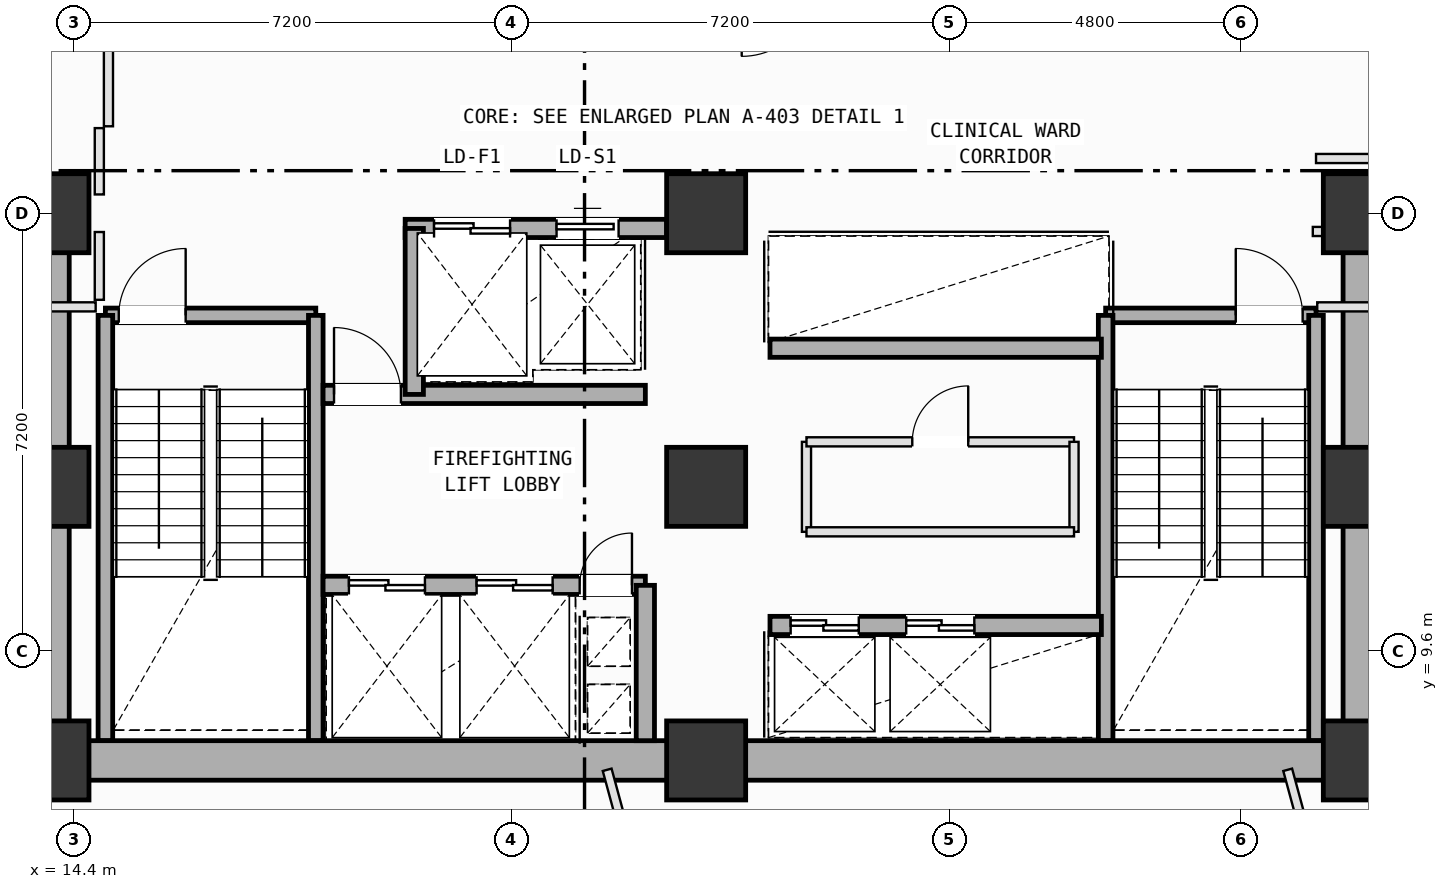
"""IFC4 building model, lengths in metres.
Left out: names, types, materials, properties, quantities, classifications, styles, units other than length and angle.
Written with IfcOpenShell. Run it as: python <this file> out.ifc"""

import sys

from ifc_helpers import new_model, si_unit, direction, frame, frame_2d, origin, origin_2d, place, context, subcontext, project, spatial, rectangle, extrude, element, fill, save


model = new_model("IFC4")
c1 = context("Model", 3, precision=1e-05, world=origin(), true_north=direction((0.0, 1.0)))
c2 = subcontext(c1, "Body", "Model", "MODEL_VIEW")
j1 = project(units=[si_unit("LENGTHUNIT", "METRE"), si_unit("PLANEANGLEUNIT", "RADIAN")], contexts=[c1])
p1 = place(None, origin())
s1 = spatial("IfcSite", under=j1, at=p1, CompositionType="ELEMENT")
p2 = place(p1, origin())
s2 = spatial("IfcBuilding", under=s1, at=p2, CompositionType="ELEMENT")
p3 = place(p2, frame((0.0, 0.0, 88.4)))
s3 = spatial("IfcBuildingStorey", under=s2, at=p3, CompositionType="ELEMENT", Elevation=88.4)
for number, where, z_axis, x_axis in (
    (1, (14.0, 7.8, 0.0), (0.0, 0.0, 1.0), (1.0, 0.0, 0.0)),
    (2, (14.0, 12.3, 0.0), (0.0, 0.0, 1.0), (1.0, 0.0, 0.0)),
    (3, (14.0, 16.8, 0.0), (0.0, 0.0, 1.0), (1.0, 0.0, 0.0)),
    (4, (24.8, 7.8, 0.0), (0.0, 0.0, 1.0), (1.0, 0.0, 0.0)),
    (5, (24.8, 12.3, 0.0), (0.0, 0.0, 1.0), (1.0, 0.0, 0.0)),
    (6, (24.8, 16.8, 0.0), (0.0, 0.0, 1.0), (1.0, 0.0, 0.0)),
    (7, (35.6, 7.8, 0.0), (0.0, 0.0, 1.0), (1.0, 0.0, 0.0)),
    (8, (35.6, 12.3, 0.0), (0.0, 0.0, 1.0), (1.0, 0.0, 0.0)),
    (9, (35.6, 16.8, 0.0), (0.0, 0.0, 1.0), (1.0, 0.0, 0.0)),
):
    element("IfcColumn", number, at=place(p3, frame(where, z_axis=z_axis, x_axis=x_axis)), inside=s3, PredefinedType="COLUMN", context=c2, shape_type="SweptSolid", body=[
        extrude(rectangle(XDim=1.3, YDim=1.3, at=origin_2d()), origin(), (0.0, 0.0, 1.0), 4.0),
    ])
p4 = place(p3, frame((14.92, 15.12, 0.0), z_axis=(0.0, 0.0, 1.0), x_axis=(1.0, 0.0, 0.0)))
e10 = element("IfcWall", 10, at=p4, inside=s3, PredefinedType="SOLIDWALL", context=c2, shape_type="SweptSolid", body=[
    extrude(rectangle(XDim=3.46, YDim=0.24, at=frame_2d((1.73, 0.0))), origin(), (0.0, 0.0, 1.0), 3.78),
])
p5 = place(p4, frame((0.22, 0.0, 0.0)))
e11 = element("IfcOpeningElement", 11, at=p5, cuts=e10, PredefinedType="OPENING", context=c2, shape_type="SweptSolid", body=[
    extrude(rectangle(XDim=1.1, YDim=2.15, at=frame_2d((0.55, 1.075))), frame((0.0, 0.13, 0.0), z_axis=(0.0, -1.0, 0.0), x_axis=(1.0, 0.0, 0.0)), (0.0, 0.0, 1.0), 0.26),
])
for number, where, z_axis, x_axis in (
    (12, (18.38, 15.12, 0.0), (0.0, 0.0, 1.0), (0.0, -1.0, 0.0)),
    (13, (14.92, 8.125, 0.0), (0.0, 0.0, 1.0), (0.0, 1.0, 0.0)),
):
    element("IfcWall", number, at=place(p3, frame(where, z_axis=z_axis, x_axis=x_axis)), inside=s3, PredefinedType="SOLIDWALL", context=c2, shape_type="SweptSolid", body=[
        extrude(rectangle(XDim=6.995, YDim=0.24, at=frame_2d((3.498, 0.0))), origin(), (0.0, 0.0, 1.0), 3.78),
    ])
p6 = place(p3, frame((31.37, 15.12, 0.0), z_axis=(0.0, 0.0, 1.0), x_axis=(1.0, 0.0, 0.0)))
e14 = element("IfcWall", 14, at=p6, inside=s3, PredefinedType="SOLIDWALL", context=c2, shape_type="SweptSolid", body=[
    extrude(rectangle(XDim=3.46, YDim=0.24, at=frame_2d((1.73, 0.0))), origin(), (0.0, 0.0, 1.0), 3.78),
])
p7 = place(p6, frame((2.14, 0.0, 0.0)))
e15 = element("IfcOpeningElement", 15, at=p7, cuts=e14, PredefinedType="OPENING", context=c2, shape_type="SweptSolid", body=[
    extrude(rectangle(XDim=1.1, YDim=2.15, at=frame_2d((0.55, 1.075))), frame((0.0, 0.13, 0.0), z_axis=(0.0, -1.0, 0.0), x_axis=(1.0, 0.0, 0.0)), (0.0, 0.0, 1.0), 0.26),
])
for number, where, z_axis, x_axis in (
    (16, (34.83, 15.12, 0.0), (0.0, 0.0, 1.0), (0.0, -1.0, 0.0)),
    (17, (31.37, 8.125, 0.0), (0.0, 0.0, 1.0), (0.0, 1.0, 0.0)),
):
    element("IfcWall", number, at=place(p3, frame(where, z_axis=z_axis, x_axis=x_axis)), inside=s3, PredefinedType="SOLIDWALL", context=c2, shape_type="SweptSolid", body=[
        extrude(rectangle(XDim=6.995, YDim=0.24, at=frame_2d((3.498, 0.0))), origin(), (0.0, 0.0, 1.0), 3.78),
    ])
for number, where, z_axis, x_axis in (
    (18, (14.0, 7.8, 0.0), (0.0, 0.0, 1.0), (1.0, 0.0, 0.0)),
    (19, (24.8, 7.8, 0.0), (0.0, 0.0, 1.0), (1.0, 0.0, 0.0)),
):
    element("IfcWall", number, at=place(p3, frame(where, z_axis=z_axis, x_axis=x_axis)), inside=s3, PredefinedType="SHEAR", context=c2, shape_type="SweptSolid", body=[
        extrude(rectangle(XDim=10.8, YDim=0.65, at=frame_2d((5.4, 0.0))), origin(), (0.0, 0.0, 1.0), 3.78),
    ])
for number, where, z_axis, x_axis in (
    (20, (35.6, 7.8, 0.0), (0.0, 0.0, 1.0), (0.0, 1.0, 0.0)),
    (21, (14.0, 16.8, 0.0), (0.0, 0.0, 1.0), (0.0, -1.0, 0.0)),
):
    element("IfcWall", number, at=place(p3, frame(where, z_axis=z_axis, x_axis=x_axis)), inside=s3, PredefinedType="SHEAR", context=c2, shape_type="SweptSolid", body=[
        extrude(rectangle(XDim=9.0, YDim=0.65, at=frame_2d((4.5, 0.0))), origin(), (0.0, 0.0, 1.0), 3.78),
    ])
p8 = place(p3, frame((19.85, 16.55, 0.0), z_axis=(0.0, 0.0, 1.0), x_axis=(1.0, 0.0, 0.0)))
e22 = element("IfcWall", 22, at=p8, inside=s3, PredefinedType="SOLIDWALL", context=c2, shape_type="SweptSolid", body=[
    extrude(rectangle(XDim=4.3, YDim=0.3, at=frame_2d((2.15, 0.0))), origin(), (0.0, 0.0, 1.0), 3.78),
])
p9 = place(p8, frame((0.475, 0.0, 0.0)))
e23 = element("IfcOpeningElement", 23, at=p9, cuts=e22, PredefinedType="OPENING", context=c2, shape_type="SweptSolid", body=[
    extrude(rectangle(XDim=1.25, YDim=2.18, at=frame_2d((0.625, 1.09))), frame((0.0, 0.16, 0.0), z_axis=(0.0, -1.0, 0.0), x_axis=(1.0, 0.0, 0.0)), (0.0, 0.0, 1.0), 0.32),
])
p10 = place(p8, frame((2.49, 0.0, 0.0)))
e24 = element("IfcOpeningElement", 24, at=p10, cuts=e22, PredefinedType="OPENING", context=c2, shape_type="SweptSolid", body=[
    extrude(rectangle(XDim=1.02, YDim=2.12, at=frame_2d((0.51, 1.06))), frame((0.0, 0.16, 0.0), z_axis=(0.0, -1.0, 0.0), x_axis=(1.0, 0.0, 0.0)), (0.0, 0.0, 1.0), 0.32),
])
p11 = place(p3, frame((18.5, 10.68, 0.0), z_axis=(0.0, 0.0, 1.0), x_axis=(1.0, 0.0, 0.0)))
e25 = element("IfcWall", 25, at=p11, inside=s3, PredefinedType="SOLIDWALL", context=c2, shape_type="SweptSolid", body=[
    extrude(rectangle(XDim=5.3, YDim=0.3, at=frame_2d((2.65, 0.0))), origin(), (0.0, 0.0, 1.0), 3.78),
])
p12 = place(p11, frame((4.22, 0.0, 0.0)))
e26 = element("IfcOpeningElement", 26, at=p12, cuts=e25, PredefinedType="OPENING", context=c2, shape_type="SweptSolid", body=[
    extrude(rectangle(XDim=0.86, YDim=2.06, at=frame_2d((0.43, 1.03))), frame((0.0, 0.16, 0.0), z_axis=(0.0, -1.0, 0.0), x_axis=(1.0, 0.0, 0.0)), (0.0, 0.0, 1.0), 0.32),
])
p13 = place(p11, frame((0.425, 0.0, 0.0)))
e27 = element("IfcOpeningElement", 27, at=p13, cuts=e25, PredefinedType="OPENING", context=c2, shape_type="SweptSolid", body=[
    extrude(rectangle(XDim=1.25, YDim=2.18, at=frame_2d((0.625, 1.09))), frame((0.0, 0.16, 0.0), z_axis=(0.0, -1.0, 0.0), x_axis=(1.0, 0.0, 0.0)), (0.0, 0.0, 1.0), 0.32),
])
p14 = place(p11, frame((2.525, 0.0, 0.0)))
e28 = element("IfcOpeningElement", 28, at=p14, cuts=e25, PredefinedType="OPENING", context=c2, shape_type="SweptSolid", body=[
    extrude(rectangle(XDim=1.25, YDim=2.18, at=frame_2d((0.625, 1.09))), frame((0.0, 0.16, 0.0), z_axis=(0.0, -1.0, 0.0), x_axis=(1.0, 0.0, 0.0)), (0.0, 0.0, 1.0), 0.32),
])
p15 = place(p3, frame((18.5, 13.82, 0.0), z_axis=(0.0, 0.0, 1.0), x_axis=(1.0, 0.0, 0.0)))
e29 = element("IfcWall", 29, at=p15, inside=s3, PredefinedType="SOLIDWALL", context=c2, shape_type="SweptSolid", body=[
    extrude(rectangle(XDim=5.3, YDim=0.3, at=frame_2d((2.65, 0.0))), origin(), (0.0, 0.0, 1.0), 3.78),
])
p16 = place(p15, frame((0.18, 0.0, 0.0)))
e30 = element("IfcOpeningElement", 30, at=p16, cuts=e29, PredefinedType="OPENING", context=c2, shape_type="SweptSolid", body=[
    extrude(rectangle(XDim=1.1, YDim=2.15, at=frame_2d((0.55, 1.075))), frame((0.0, 0.16, 0.0), z_axis=(0.0, -1.0, 0.0), x_axis=(1.0, 0.0, 0.0)), (0.0, 0.0, 1.0), 0.32),
])
p17 = place(p3, frame((23.8, 8.125, 0.0), z_axis=(0.0, 0.0, 1.0), x_axis=(0.0, 1.0, 0.0)))
e31 = element("IfcWall", 31, at=p17, inside=s3, PredefinedType="SOLIDWALL", context=c2, shape_type="SweptSolid", body=[
    extrude(rectangle(XDim=2.555, YDim=0.3, at=frame_2d((1.277, 0.0))), origin(), (0.0, 0.0, 1.0), 3.78),
])
p18 = place(p3, frame((20.0, 13.82, 0.0), z_axis=(0.0, 0.0, 1.0), x_axis=(0.0, 1.0, 0.0)))
e32 = element("IfcWall", 32, at=p18, inside=s3, PredefinedType="SOLIDWALL", context=c2, shape_type="SweptSolid", body=[
    extrude(rectangle(XDim=2.73, YDim=0.3, at=frame_2d((1.365, 0.0))), origin(), (0.0, 0.0, 1.0), 3.78),
])
p19 = place(p3, frame((25.85, 10.02, 0.0), z_axis=(0.0, 0.0, 1.0), x_axis=(1.0, 0.0, 0.0)))
e33 = element("IfcWall", 33, at=p19, inside=s3, PredefinedType="SOLIDWALL", context=c2, shape_type="SweptSolid", body=[
    extrude(rectangle(XDim=5.45, YDim=0.3, at=frame_2d((2.725, 0.0))), origin(), (0.0, 0.0, 1.0), 3.78),
])
p20 = place(p19, frame((0.34, 0.0, 0.0)))
e34 = element("IfcOpeningElement", 34, at=p20, cuts=e33, PredefinedType="OPENING", context=c2, shape_type="SweptSolid", body=[
    extrude(rectangle(XDim=1.12, YDim=2.15, at=frame_2d((0.56, 1.075))), frame((0.0, 0.16, 0.0), z_axis=(0.0, -1.0, 0.0), x_axis=(1.0, 0.0, 0.0)), (0.0, 0.0, 1.0), 0.32),
])
p21 = place(p19, frame((2.24, 0.0, 0.0)))
e35 = element("IfcOpeningElement", 35, at=p21, cuts=e33, PredefinedType="OPENING", context=c2, shape_type="SweptSolid", body=[
    extrude(rectangle(XDim=1.12, YDim=2.15, at=frame_2d((0.56, 1.075))), frame((0.0, 0.16, 0.0), z_axis=(0.0, -1.0, 0.0), x_axis=(1.0, 0.0, 0.0)), (0.0, 0.0, 1.0), 0.32),
])
p22 = place(p3, frame((25.85, 14.58, 0.0), z_axis=(0.0, 0.0, 1.0), x_axis=(1.0, 0.0, 0.0)))
e36 = element("IfcWall", 36, at=p22, inside=s3, PredefinedType="SOLIDWALL", context=c2, shape_type="SweptSolid", body=[
    extrude(rectangle(XDim=5.45, YDim=0.3, at=frame_2d((2.725, 0.0))), origin(), (0.0, 0.0, 1.0), 3.78),
])
p23 = place(p3, frame((26.45, 11.56, 0.0), z_axis=(0.0, 0.0, 1.0), x_axis=(0.0, 1.0, 0.0)))
e37 = element("IfcWall", 37, at=p23, inside=s3, PredefinedType="PARTITIONING", context=c2, shape_type="SweptSolid", body=[
    extrude(rectangle(XDim=1.48, YDim=0.15, at=frame_2d((0.74, 0.0))), origin(), (0.0, 0.0, 1.0), 3.78),
])
p24 = place(p3, frame((26.45, 13.04, 0.0), z_axis=(0.0, 0.0, 1.0), x_axis=(1.0, 0.0, 0.0)))
e38 = element("IfcWall", 38, at=p24, inside=s3, PredefinedType="PARTITIONING", context=c2, shape_type="SweptSolid", body=[
    extrude(rectangle(XDim=4.4, YDim=0.15, at=frame_2d((2.2, 0.0))), origin(), (0.0, 0.0, 1.0), 3.78),
])
p25 = place(p24, frame((1.74, 0.0, 0.0)))
e39 = element("IfcOpeningElement", 39, at=p25, cuts=e38, PredefinedType="OPENING", context=c2, shape_type="SweptSolid", body=[
    extrude(rectangle(XDim=0.92, YDim=2.1, at=frame_2d((0.46, 1.05))), frame((0.0, 0.085, 0.0), z_axis=(0.0, -1.0, 0.0), x_axis=(1.0, 0.0, 0.0)), (0.0, 0.0, 1.0), 0.17),
])
p26 = place(p3, frame((30.85, 13.04, 0.0), z_axis=(0.0, 0.0, 1.0), x_axis=(0.0, -1.0, 0.0)))
e40 = element("IfcWall", 40, at=p26, inside=s3, PredefinedType="PARTITIONING", context=c2, shape_type="SweptSolid", body=[
    extrude(rectangle(XDim=1.48, YDim=0.15, at=frame_2d((0.74, 0.0))), origin(), (0.0, 0.0, 1.0), 3.78),
])
p27 = place(p3, frame((30.85, 11.56, 0.0), z_axis=(0.0, 0.0, 1.0), x_axis=(-1.0, 0.0, 0.0)))
e41 = element("IfcWall", 41, at=p27, inside=s3, PredefinedType="PARTITIONING", context=c2, shape_type="SweptSolid", body=[
    extrude(rectangle(XDim=4.4, YDim=0.15, at=frame_2d((2.2, 0.0))), origin(), (0.0, 0.0, 1.0), 3.78),
])
p28 = place(p3, frame((23.172, 7.646, 0.0), z_axis=(0.0, 0.0, 1.0), x_axis=(0.262180889196, -0.965018746626, 0.0)))
e42 = element("IfcWall", 42, at=p28, inside=s3, PredefinedType="PARTITIONING", context=c2, shape_type="SweptSolid", body=[
    extrude(rectangle(XDim=8.295, YDim=0.15, at=frame_2d((4.147, 0.0))), origin(), (0.0, 0.0, 1.0), 3.78),
])
p29 = place(p28, frame((3.873, 0.0, 0.0)))
e43 = element("IfcOpeningElement", 43, at=p29, cuts=e42, PredefinedType="OPENING", context=c2, shape_type="SweptSolid", body=[
    extrude(rectangle(XDim=0.86, YDim=2.06, at=frame_2d((0.43, 1.03))), frame((0.0, 0.085, 0.0), z_axis=(0.0, -1.0, 0.0), x_axis=(1.0, 0.0, 0.0)), (0.0, 0.0, 1.0), 0.17),
])
p30 = place(p3, frame((34.364, 7.646, 0.0), z_axis=(0.0, 0.0, 1.0), x_axis=(0.262277228578, -0.96499256752, 0.0)))
e44 = element("IfcWall", 44, at=p30, inside=s3, PredefinedType="PARTITIONING", context=c2, shape_type="SweptSolid", body=[
    extrude(rectangle(XDim=5.361, YDim=0.15, at=frame_2d((2.68, 0.0))), origin(), (0.0, 0.0, 1.0), 3.78),
])
p31 = place(p30, frame((2.406, 0.0, 0.0)))
e45 = element("IfcOpeningElement", 45, at=p31, cuts=e44, PredefinedType="OPENING", context=c2, shape_type="SweptSolid", body=[
    extrude(rectangle(XDim=0.86, YDim=2.06, at=frame_2d((0.43, 1.03))), frame((0.0, 0.085, 0.0), z_axis=(0.0, -1.0, 0.0), x_axis=(1.0, 0.0, 0.0)), (0.0, 0.0, 1.0), 0.17),
])
p32 = place(p3, frame((35.6, 7.5, 0.0), z_axis=(0.0, 0.0, 1.0), x_axis=(1.0, 0.0, 0.0)))
e46 = element("IfcWall", 46, at=p32, inside=s3, PredefinedType="PARTITIONING", context=c2, shape_type="SweptSolid", body=[
    extrude(rectangle(XDim=0.55, YDim=0.15, at=frame_2d((0.275, 0.0))), origin(), (0.0, 0.0, 1.0), 2.745),
])
p33 = place(p3, frame((36.15, 15.26, 0.0), z_axis=(0.0, 0.0, 1.0), x_axis=(-1.0, 0.0, 0.0)))
e47 = element("IfcWall", 47, at=p33, inside=s3, PredefinedType="PARTITIONING", context=c2, shape_type="SweptSolid", body=[
    extrude(rectangle(XDim=1.3, YDim=0.15, at=frame_2d((0.65, 0.0))), origin(), (0.0, 0.0, 1.0), 3.78),
])
p34 = place(p3, frame((34.777, 16.5, 0.0), z_axis=(0.0, 0.0, 1.0), x_axis=(1.0, 0.0, 0.0)))
e48 = element("IfcWall", 48, at=p34, inside=s3, PredefinedType="PARTITIONING", context=c2, shape_type="SweptSolid", body=[
    extrude(rectangle(XDim=1.723, YDim=0.15, at=frame_2d((0.861, 0.0))), origin(), (0.0, 0.0, 1.0), 2.765),
])
p35 = place(p3, frame((36.5, 17.7, 0.0), z_axis=(0.0, 0.0, 1.0), x_axis=(-1.0, 0.0, 0.0)))
e49 = element("IfcWall", 49, at=p35, inside=s3, PredefinedType="PARTITIONING", context=c2, shape_type="SweptSolid", body=[
    extrude(rectangle(XDim=1.67, YDim=0.15, at=frame_2d((0.835, 0.0))), origin(), (0.0, 0.0, 1.0), 3.78),
])
p36 = place(p3, frame((14.97, 20.55, 0.0), z_axis=(0.0, 0.0, 1.0), x_axis=(0.0, -1.0, 0.0)))
e50 = element("IfcWall", 50, at=p36, inside=s3, PredefinedType="PARTITIONING", context=c2, shape_type="SweptSolid", body=[
    extrude(rectangle(XDim=2.32, YDim=0.15, at=frame_2d((1.16, 0.0))), origin(), (0.0, 0.0, 1.0), 2.765),
])
p37 = place(p3, frame((14.82, 18.2, 0.0), z_axis=(0.0, 0.0, 1.0), x_axis=(0.0, -1.0, 0.0)))
e51 = element("IfcWall", 51, at=p37, inside=s3, PredefinedType="PARTITIONING", context=c2, shape_type="SweptSolid", body=[
    extrude(rectangle(XDim=1.091, YDim=0.15, at=frame_2d((0.545, 0.0))), origin(), (0.0, 0.0, 1.0), 3.78),
])
p38 = place(p3, frame((14.82, 16.491, 0.0), z_axis=(0.0, 0.0, 1.0), x_axis=(0.0, -1.0, 0.0)))
e52 = element("IfcWall", 52, at=p38, inside=s3, PredefinedType="PARTITIONING", context=c2, shape_type="SweptSolid", body=[
    extrude(rectangle(XDim=1.115, YDim=0.15, at=frame_2d((0.558, 0.0))), origin(), (0.0, 0.0, 1.0), 3.78),
])
p39 = place(p3, frame((14.76, 15.26, 0.0), z_axis=(0.0, 0.0, 1.0), x_axis=(-1.0, 0.0, 0.0)))
e53 = element("IfcWall", 53, at=p39, inside=s3, PredefinedType="PARTITIONING", context=c2, shape_type="SweptSolid", body=[
    extrude(rectangle(XDim=1.06, YDim=0.15, at=frame_2d((0.53, 0.0))), origin(), (0.0, 0.0, 1.0), 3.78),
])
p40 = place(p5, origin())
e54 = element("IfcDoor", 54, at=p40, inside=s3, OperationType="SINGLE_SWING_RIGHT", PredefinedType="DOOR", context=c2, shape_type="SweptSolid", body=[
    extrude(rectangle(XDim=1.1, YDim=2.15, at=frame_2d((0.55, 1.075))), frame((0.0, 0.025, 0.0), z_axis=(0.0, -1.0, 0.0), x_axis=(1.0, 0.0, 0.0)), (0.0, 0.0, 1.0), 0.05),
])
fill(e11, e54)
p41 = place(p7, origin())
e55 = element("IfcDoor", 55, at=p41, inside=s3, OperationType="SINGLE_SWING_LEFT", PredefinedType="DOOR", context=c2, shape_type="SweptSolid", body=[
    extrude(rectangle(XDim=1.1, YDim=2.15, at=frame_2d((0.55, 1.075))), frame((0.0, 0.025, 0.0), z_axis=(0.0, -1.0, 0.0), x_axis=(1.0, 0.0, 0.0)), (0.0, 0.0, 1.0), 0.05),
])
fill(e15, e55)
p42 = place(p12, origin())
e56 = element("IfcDoor", 56, at=p42, inside=s3, OperationType="SINGLE_SWING_RIGHT", PredefinedType="DOOR", context=c2, shape_type="SweptSolid", body=[
    extrude(rectangle(XDim=0.86, YDim=2.06, at=frame_2d((0.43, 1.03))), frame((0.0, 0.025, 0.0), z_axis=(0.0, -1.0, 0.0), x_axis=(1.0, 0.0, 0.0)), (0.0, 0.0, 1.0), 0.05),
])
fill(e26, e56)
p43 = place(p16, origin())
e57 = element("IfcDoor", 57, at=p43, inside=s3, OperationType="SINGLE_SWING_LEFT", PredefinedType="DOOR", context=c2, shape_type="SweptSolid", body=[
    extrude(rectangle(XDim=1.1, YDim=2.15, at=frame_2d((0.55, 1.075))), frame((0.0, 0.025, 0.0), z_axis=(0.0, -1.0, 0.0), x_axis=(1.0, 0.0, 0.0)), (0.0, 0.0, 1.0), 0.05),
])
fill(e30, e57)
p44 = place(p13, origin())
e58 = element("IfcDoor", 58, at=p44, inside=s3, OperationType="DOUBLE_DOOR_SLIDING", PredefinedType="DOOR", context=c2, shape_type="SweptSolid", body=[
    extrude(rectangle(XDim=1.25, YDim=2.18, at=frame_2d((0.625, 1.09))), frame((0.0, 0.025, 0.0), z_axis=(0.0, -1.0, 0.0), x_axis=(1.0, 0.0, 0.0)), (0.0, 0.0, 1.0), 0.05),
])
fill(e27, e58)
p45 = place(p14, origin())
e59 = element("IfcDoor", 59, at=p45, inside=s3, OperationType="DOUBLE_DOOR_SLIDING", PredefinedType="DOOR", context=c2, shape_type="SweptSolid", body=[
    extrude(rectangle(XDim=1.25, YDim=2.18, at=frame_2d((0.625, 1.09))), frame((0.0, 0.025, 0.0), z_axis=(0.0, -1.0, 0.0), x_axis=(1.0, 0.0, 0.0)), (0.0, 0.0, 1.0), 0.05),
])
fill(e28, e59)
p46 = place(p20, origin())
e60 = element("IfcDoor", 60, at=p46, inside=s3, OperationType="DOUBLE_DOOR_SLIDING", PredefinedType="DOOR", context=c2, shape_type="SweptSolid", body=[
    extrude(rectangle(XDim=1.12, YDim=2.15, at=frame_2d((0.56, 1.075))), frame((0.0, 0.025, 0.0), z_axis=(0.0, -1.0, 0.0), x_axis=(1.0, 0.0, 0.0)), (0.0, 0.0, 1.0), 0.05),
])
fill(e34, e60)
p47 = place(p21, origin())
e61 = element("IfcDoor", 61, at=p47, inside=s3, OperationType="DOUBLE_DOOR_SLIDING", PredefinedType="DOOR", context=c2, shape_type="SweptSolid", body=[
    extrude(rectangle(XDim=1.12, YDim=2.15, at=frame_2d((0.56, 1.075))), frame((0.0, 0.025, 0.0), z_axis=(0.0, -1.0, 0.0), x_axis=(1.0, 0.0, 0.0)), (0.0, 0.0, 1.0), 0.05),
])
fill(e35, e61)
p48 = place(p9, origin())
e62 = element("IfcDoor", 62, at=p48, inside=s3, OperationType="DOUBLE_DOOR_SLIDING", PredefinedType="DOOR", context=c2, shape_type="SweptSolid", body=[
    extrude(rectangle(XDim=1.25, YDim=2.18, at=frame_2d((0.625, 1.09))), frame((0.0, 0.025, 0.0), z_axis=(0.0, -1.0, 0.0), x_axis=(1.0, 0.0, 0.0)), (0.0, 0.0, 1.0), 0.05),
])
fill(e23, e62)
p49 = place(p10, origin())
e63 = element("IfcDoor", 63, at=p49, inside=s3, OperationType="SLIDING_TO_LEFT", PredefinedType="DOOR", context=c2, shape_type="SweptSolid", body=[
    extrude(rectangle(XDim=1.02, YDim=2.12, at=frame_2d((0.51, 1.06))), frame((0.0, 0.025, 0.0), z_axis=(0.0, -1.0, 0.0), x_axis=(1.0, 0.0, 0.0)), (0.0, 0.0, 1.0), 0.05),
])
fill(e24, e63)
p50 = place(p25, origin())
e64 = element("IfcDoor", 64, at=p50, inside=s3, OperationType="SINGLE_SWING_RIGHT", PredefinedType="DOOR", context=c2, shape_type="SweptSolid", body=[
    extrude(rectangle(XDim=0.92, YDim=2.1, at=frame_2d((0.46, 1.05))), frame((0.0, 0.025, 0.0), z_axis=(0.0, -1.0, 0.0), x_axis=(1.0, 0.0, 0.0)), (0.0, 0.0, 1.0), 0.05),
])
fill(e39, e64)
save(model, sys.argv[1])
